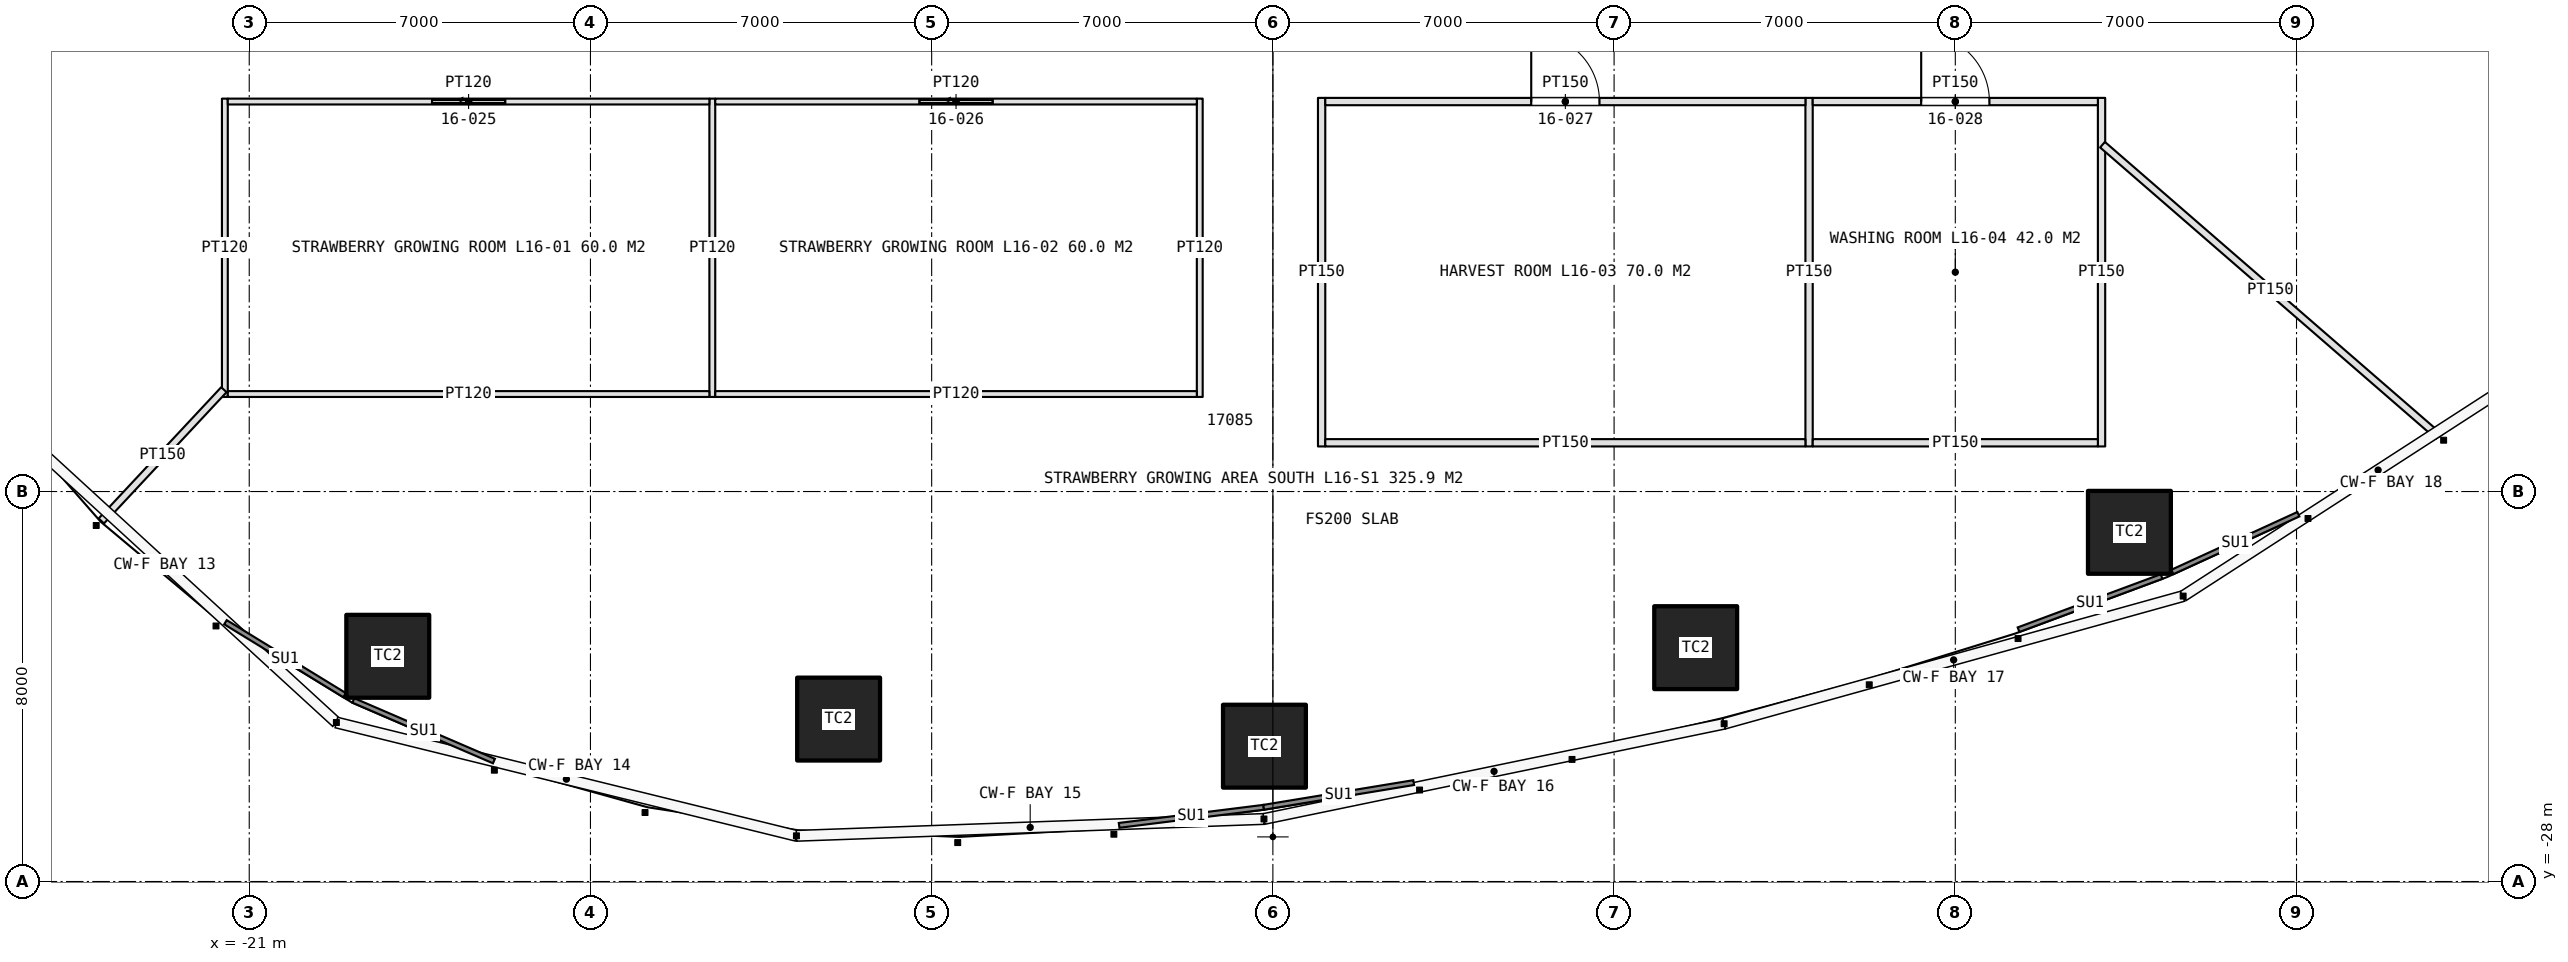
"""IFC4 building model, lengths in metres.
Left out: names, types, materials, properties, quantities, classifications, styles, units other than length and angle.
Written with IfcOpenShell. Run it as: python <this file> out.ifc"""

import sys

from ifc_helpers import new_model, si_unit, direction, frame, frame_2d, origin, origin_2d, place, context, subcontext, project, spatial, rectangle, extrude, element, fill, save


model = new_model("IFC4")
c1 = context("Model", 3, precision=1e-05, world=origin(), true_north=direction((0.0, 1.0)))
c2 = subcontext(c1, "Body", "Model", "MODEL_VIEW")
j1 = project(units=[si_unit("LENGTHUNIT", "METRE"), si_unit("PLANEANGLEUNIT", "RADIAN")], contexts=[c1])
p1 = place(None, origin())
s1 = spatial("IfcSite", under=j1, at=p1, CompositionType="ELEMENT")
p2 = place(p1, origin())
s2 = spatial("IfcBuilding", under=s1, at=p2, CompositionType="ELEMENT")
p3 = place(p2, frame((0.0, 0.0, 80.0)))
s3 = spatial("IfcBuildingStorey", under=s2, at=p3, CompositionType="ELEMENT", Elevation=80.0)
for number, where, z_axis, x_axis in (
    (1, (-18.158, -23.38, 0.0), (0.0, 0.0, 1.0), (1.0, 0.0, 0.0)),
    (2, (-8.909, -24.668, 0.0), (0.0, 0.0, 1.0), (1.0, 0.0, 0.0)),
    (3, (-0.173, -25.224, 0.0), (0.0, 0.0, 1.0), (1.0, 0.0, 0.0)),
    (4, (8.674, -23.203, 0.0), (0.0, 0.0, 1.0), (1.0, 0.0, 0.0)),
    (5, (17.572, -20.837, 0.0), (0.0, 0.0, 1.0), (1.0, 0.0, 0.0)),
):
    element("IfcColumn", number, at=place(p3, frame(where, z_axis=z_axis, x_axis=x_axis)), inside=s3, PredefinedType="COLUMN", context=c2, shape_type="SweptSolid", body=[
        extrude(rectangle(XDim=1.7, YDim=1.7, at=origin_2d()), origin(), (0.0, 0.0, 1.0), 5.0),
    ])
for number, where, z_axis, x_axis in (
    (6, (-21.5, -11.94, 0.0), (0.0, 0.0, 1.0), (0.0, -1.0, 0.0)),
    (7, (-11.5, -11.94, 0.0), (0.0, 0.0, 1.0), (0.0, -1.0, 0.0)),
    (8, (-1.5, -11.94, 0.0), (0.0, 0.0, 1.0), (0.0, -1.0, 0.0)),
):
    element("IfcWall", number, at=place(p3, frame(where, z_axis=z_axis, x_axis=x_axis)), inside=s3, PredefinedType="PARTITIONING", context=c2, shape_type="SweptSolid", body=[
        extrude(rectangle(XDim=6.12, YDim=0.12, at=frame_2d((3.06, 0.0))), origin(), (0.0, 0.0, 1.0), 3.6),
    ])
p4 = place(p3, frame((-21.44, -12.0, 0.0), z_axis=(0.0, 0.0, 1.0), x_axis=(1.0, 0.0, 0.0)))
e9 = element("IfcWall", 9, at=p4, inside=s3, PredefinedType="PARTITIONING", context=c2, shape_type="SweptSolid", body=[
    extrude(rectangle(XDim=9.88, YDim=0.12, at=frame_2d((4.94, 0.0))), origin(), (0.0, 0.0, 1.0), 3.6),
])
p5 = place(p4, frame((4.19, 0.0, 0.0)))
e10 = element("IfcOpeningElement", 10, at=p5, cuts=e9, PredefinedType="OPENING", context=c2, shape_type="SweptSolid", body=[
    extrude(rectangle(XDim=1.5, YDim=2.5, at=frame_2d((0.75, 1.25))), frame((0.0, 0.07, 0.0), z_axis=(0.0, -1.0, 0.0), x_axis=(1.0, 0.0, 0.0)), (0.0, 0.0, 1.0), 0.14),
])
p6 = place(p3, frame((-21.44, -18.0, 0.0), z_axis=(0.0, 0.0, 1.0), x_axis=(1.0, 0.0, 0.0)))
e11 = element("IfcWall", 11, at=p6, inside=s3, PredefinedType="PARTITIONING", context=c2, shape_type="SweptSolid", body=[
    extrude(rectangle(XDim=9.88, YDim=0.12, at=frame_2d((4.94, 0.0))), origin(), (0.0, 0.0, 1.0), 3.6),
])
p7 = place(p3, frame((-11.44, -12.0, 0.0), z_axis=(0.0, 0.0, 1.0), x_axis=(1.0, 0.0, 0.0)))
e12 = element("IfcWall", 12, at=p7, inside=s3, PredefinedType="PARTITIONING", context=c2, shape_type="SweptSolid", body=[
    extrude(rectangle(XDim=9.88, YDim=0.12, at=frame_2d((4.94, 0.0))), origin(), (0.0, 0.0, 1.0), 3.6),
])
p8 = place(p7, frame((4.19, 0.0, 0.0)))
e13 = element("IfcOpeningElement", 13, at=p8, cuts=e12, PredefinedType="OPENING", context=c2, shape_type="SweptSolid", body=[
    extrude(rectangle(XDim=1.5, YDim=2.5, at=frame_2d((0.75, 1.25))), frame((0.0, 0.07, 0.0), z_axis=(0.0, -1.0, 0.0), x_axis=(1.0, 0.0, 0.0)), (0.0, 0.0, 1.0), 0.14),
])
p9 = place(p3, frame((-11.44, -18.0, 0.0), z_axis=(0.0, 0.0, 1.0), x_axis=(1.0, 0.0, 0.0)))
e14 = element("IfcWall", 14, at=p9, inside=s3, PredefinedType="PARTITIONING", context=c2, shape_type="SweptSolid", body=[
    extrude(rectangle(XDim=9.88, YDim=0.12, at=frame_2d((4.94, 0.0))), origin(), (0.0, 0.0, 1.0), 3.6),
])
for number, where, z_axis, x_axis in (
    (15, (1.0, -11.925, 0.0), (0.0, 0.0, 1.0), (0.0, -1.0, 0.0)),
    (16, (11.0, -11.925, 0.0), (0.0, 0.0, 1.0), (0.0, -1.0, 0.0)),
    (17, (17.0, -11.925, 0.0), (0.0, 0.0, 1.0), (0.0, -1.0, 0.0)),
):
    element("IfcWall", number, at=place(p3, frame(where, z_axis=z_axis, x_axis=x_axis)), inside=s3, PredefinedType="PARTITIONING", context=c2, shape_type="SweptSolid", body=[
        extrude(rectangle(XDim=7.15, YDim=0.15, at=frame_2d((3.575, 0.0))), origin(), (0.0, 0.0, 1.0), 3.6),
    ])
p10 = place(p3, frame((1.075, -12.0, 0.0), z_axis=(0.0, 0.0, 1.0), x_axis=(1.0, 0.0, 0.0)))
e18 = element("IfcWall", 18, at=p10, inside=s3, PredefinedType="PARTITIONING", context=c2, shape_type="SweptSolid", body=[
    extrude(rectangle(XDim=9.85, YDim=0.15, at=frame_2d((4.925, 0.0))), origin(), (0.0, 0.0, 1.0), 3.6),
])
p11 = place(p10, frame((4.225, 0.0, 0.0)))
e19 = element("IfcOpeningElement", 19, at=p11, cuts=e18, PredefinedType="OPENING", context=c2, shape_type="SweptSolid", body=[
    extrude(rectangle(XDim=1.4, YDim=2.4, at=frame_2d((0.7, 1.2))), frame((0.0, 0.085, 0.0), z_axis=(0.0, -1.0, 0.0), x_axis=(1.0, 0.0, 0.0)), (0.0, 0.0, 1.0), 0.17),
])
p12 = place(p3, frame((1.075, -19.0, 0.0), z_axis=(0.0, 0.0, 1.0), x_axis=(1.0, 0.0, 0.0)))
e20 = element("IfcWall", 20, at=p12, inside=s3, PredefinedType="PARTITIONING", context=c2, shape_type="SweptSolid", body=[
    extrude(rectangle(XDim=9.85, YDim=0.15, at=frame_2d((4.925, 0.0))), origin(), (0.0, 0.0, 1.0), 3.6),
])
p13 = place(p3, frame((11.075, -12.0, 0.0), z_axis=(0.0, 0.0, 1.0), x_axis=(1.0, 0.0, 0.0)))
e21 = element("IfcWall", 21, at=p13, inside=s3, PredefinedType="PARTITIONING", context=c2, shape_type="SweptSolid", body=[
    extrude(rectangle(XDim=5.85, YDim=0.15, at=frame_2d((2.925, 0.0))), origin(), (0.0, 0.0, 1.0), 3.6),
])
p14 = place(p13, frame((2.225, 0.0, 0.0)))
e22 = element("IfcOpeningElement", 22, at=p14, cuts=e21, PredefinedType="OPENING", context=c2, shape_type="SweptSolid", body=[
    extrude(rectangle(XDim=1.4, YDim=2.4, at=frame_2d((0.7, 1.2))), frame((0.0, 0.085, 0.0), z_axis=(0.0, -1.0, 0.0), x_axis=(1.0, 0.0, 0.0)), (0.0, 0.0, 1.0), 0.17),
])
p15 = place(p3, frame((11.075, -19.0, 0.0), z_axis=(0.0, 0.0, 1.0), x_axis=(1.0, 0.0, 0.0)))
e23 = element("IfcWall", 23, at=p15, inside=s3, PredefinedType="PARTITIONING", context=c2, shape_type="SweptSolid", body=[
    extrude(rectangle(XDim=5.85, YDim=0.15, at=frame_2d((2.925, 0.0))), origin(), (0.0, 0.0, 1.0), 3.6),
])
p16 = place(p3, frame((-21.52, -17.911, 0.0), z_axis=(0.0, 0.0, 1.0), x_axis=(-0.682507100249, -0.730878962694, 0.0)))
e24 = element("IfcWall", 24, at=p16, inside=s3, PredefinedType="PARTITIONING", context=c2, shape_type="SweptSolid", body=[
    extrude(rectangle(XDim=3.684, YDim=0.15, at=frame_2d((1.842, 0.0))), origin(), (0.0, 0.0, 1.0), 3.6),
])
p17 = place(p3, frame((17.02, -12.885, 0.0), z_axis=(0.0, 0.0, 1.0), x_axis=(0.755439011433, -0.655218971035, 0.0)))
e25 = element("IfcWall", 25, at=p17, inside=s3, PredefinedType="PARTITIONING", context=c2, shape_type="SweptSolid", body=[
    extrude(rectangle(XDim=9.118, YDim=0.15, at=frame_2d((4.559, 0.0))), origin(), (0.0, 0.0, 1.0), 3.6),
])
p18 = place(p5, origin())
e26 = element("IfcDoor", 26, at=p18, inside=s3, OperationType="SLIDING_TO_LEFT", PredefinedType="DOOR", context=c2, shape_type="SweptSolid", body=[
    extrude(rectangle(XDim=1.5, YDim=2.5, at=frame_2d((0.75, 1.25))), frame((0.0, 0.025, 0.0), z_axis=(0.0, -1.0, 0.0), x_axis=(1.0, 0.0, 0.0)), (0.0, 0.0, 1.0), 0.05),
])
fill(e10, e26)
p19 = place(p8, origin())
e27 = element("IfcDoor", 27, at=p19, inside=s3, OperationType="SLIDING_TO_LEFT", PredefinedType="DOOR", context=c2, shape_type="SweptSolid", body=[
    extrude(rectangle(XDim=1.5, YDim=2.5, at=frame_2d((0.75, 1.25))), frame((0.0, 0.025, 0.0), z_axis=(0.0, -1.0, 0.0), x_axis=(1.0, 0.0, 0.0)), (0.0, 0.0, 1.0), 0.05),
])
fill(e13, e27)
p20 = place(p11, origin())
e28 = element("IfcDoor", 28, at=p20, inside=s3, OperationType="DOUBLE_DOOR_DOUBLE_SWING", PredefinedType="DOOR", context=c2, shape_type="SweptSolid", body=[
    extrude(rectangle(XDim=1.4, YDim=2.4, at=frame_2d((0.7, 1.2))), frame((0.0, 0.025, 0.0), z_axis=(0.0, -1.0, 0.0), x_axis=(1.0, 0.0, 0.0)), (0.0, 0.0, 1.0), 0.05),
])
fill(e19, e28)
p21 = place(p14, origin())
e29 = element("IfcDoor", 29, at=p21, inside=s3, OperationType="DOUBLE_DOOR_DOUBLE_SWING", PredefinedType="DOOR", context=c2, shape_type="SweptSolid", body=[
    extrude(rectangle(XDim=1.4, YDim=2.4, at=frame_2d((0.7, 1.2))), frame((0.0, 0.025, 0.0), z_axis=(0.0, -1.0, 0.0), x_axis=(1.0, 0.0, 0.0)), (0.0, 0.0, 1.0), 0.05),
])
fill(e22, e29)
save(model, sys.argv[1])
